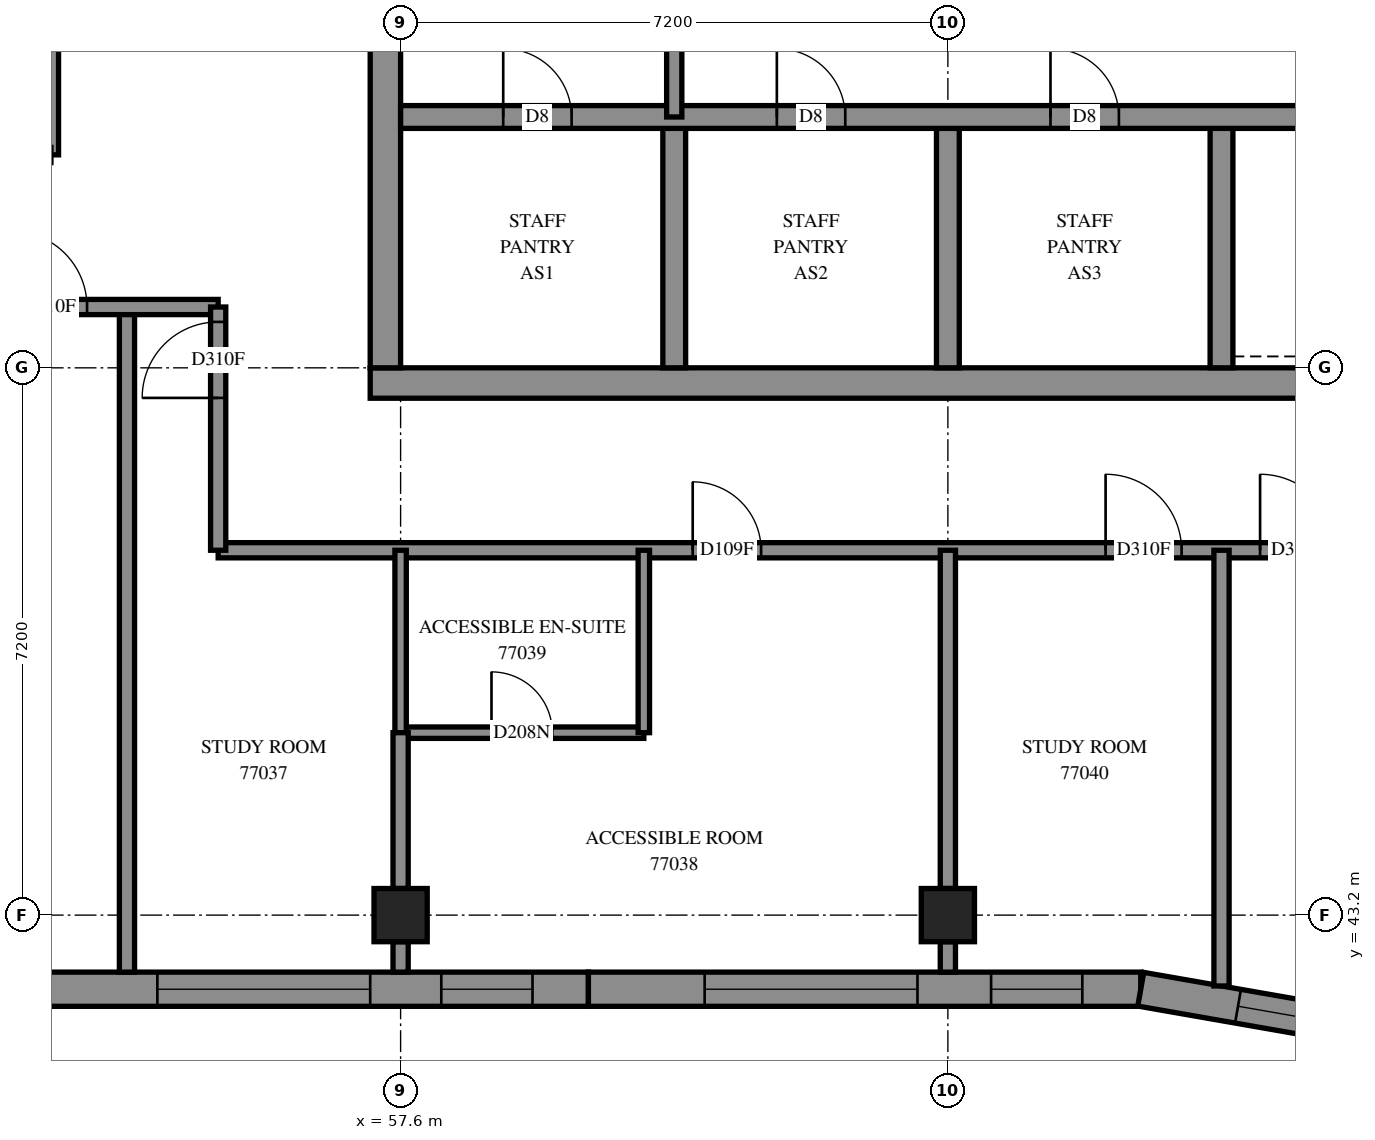
"""IFC4 building model, lengths in metres.
Left out: names, types, materials, properties, quantities, classifications, styles, units other than length and angle.
Written with IfcOpenShell. Run it as: python <this file> out.ifc"""

import sys

from ifc_helpers import new_model, si_unit, direction, frame, frame_2d, origin, origin_2d, place, context, subcontext, project, spatial, polyline, rectangle, outline, extrude, element, fill, save


model = new_model("IFC4")
c1 = context("Model", 3, precision=1e-05, world=origin(), true_north=direction((0.0, 1.0)))
c2 = subcontext(c1, "Body", "Model", "MODEL_VIEW")
j1 = project(units=[si_unit("LENGTHUNIT", "METRE"), si_unit("PLANEANGLEUNIT", "RADIAN")], contexts=[c1])
p1 = place(None, origin())
s1 = spatial("IfcSite", under=j1, at=p1, CompositionType="ELEMENT")
p2 = place(p1, origin())
s2 = spatial("IfcBuilding", under=s1, at=p2, CompositionType="ELEMENT")
p3 = place(p2, frame((0.0, 0.0, 281.2)))
s3 = spatial("IfcBuildingStorey", under=s2, at=p3, CompositionType="ELEMENT", Elevation=281.2)
for number, where, z_axis, x_axis in (
    (1, (57.6, 43.2, 0.0), (0.0, 0.0, 1.0), (1.0, 0.0, 0.0)),
    (2, (64.8, 43.2, 0.0), (0.0, 0.0, 1.0), (1.0, 0.0, 0.0)),
):
    element("IfcColumn", number, at=place(p3, frame(where, z_axis=z_axis, x_axis=x_axis)), inside=s3, PredefinedType="COLUMN", context=c2, shape_type="SweptSolid", body=[
        extrude(rectangle(XDim=0.7, YDim=0.7, at=origin_2d()), origin(), (0.0, 0.0, 1.0), 3.1),
    ])
p4 = place(p3, frame((57.2, 50.2, -0.3), z_axis=(0.0, 0.0, 1.0), x_axis=(1.0, 0.0, 0.0)))
e3 = element("IfcWall", 3, at=p4, inside=s3, PredefinedType="SHEAR", context=c2, shape_type="SweptSolid", body=[
    extrude(rectangle(XDim=15.2, YDim=0.4, at=frame_2d((7.6, 0.0))), origin(), (0.0, 0.0, 1.0), 2.7),
])
p5 = place(p3, frame((57.4, 50.4, -0.3), z_axis=(0.0, 0.0, 1.0), x_axis=(0.0, 1.0, 0.0)))
e4 = element("IfcWall", 4, at=p5, inside=s3, PredefinedType="SHEAR", context=c2, shape_type="SweptSolid", body=[
    extrude(rectangle(XDim=14.4, YDim=0.4, at=frame_2d((7.2, 0.0))), origin(), (0.0, 0.0, 1.0), 2.7),
])
p6 = place(p5, frame((4.55, 0.0, 0.3)))
e5 = element("IfcOpeningElement", 5, at=p6, cuts=e4, PredefinedType="OPENING", context=c2, shape_type="SweptSolid", body=[
    extrude(rectangle(XDim=1.1, YDim=2.1, at=frame_2d((0.55, 1.05))), frame((0.0, 0.21, 0.0), z_axis=(0.0, -1.0, 0.0), x_axis=(1.0, 0.0, 0.0)), (0.0, 0.0, 1.0), 0.42),
])
p7 = place(p5, frame((11.35, 0.0, 0.3)))
e6 = element("IfcOpeningElement", 6, at=p7, cuts=e4, PredefinedType="OPENING", context=c2, shape_type="SweptSolid", body=[
    extrude(rectangle(XDim=1.1, YDim=2.1, at=frame_2d((0.55, 1.05))), frame((0.0, 0.21, 0.0), z_axis=(0.0, -1.0, 0.0), x_axis=(1.0, 0.0, 0.0)), (0.0, 0.0, 1.0), 0.42),
])
for number, where, z_axis, x_axis in (
    (7, (61.2, 50.4, 0.0), (0.0, 0.0, 1.0), (0.0, 1.0, 0.0)),
    (8, (64.8, 50.4, 0.0), (0.0, 0.0, 1.0), (0.0, 1.0, 0.0)),
    (9, (68.4, 50.4, 0.0), (0.0, 0.0, 1.0), (0.0, 1.0, 0.0)),
):
    element("IfcWall", number, at=place(p3, frame(where, z_axis=z_axis, x_axis=x_axis)), inside=s3, PredefinedType="SOLIDWALL", context=c2, shape_type="SweptSolid", body=[
        extrude(rectangle(XDim=3.3, YDim=0.3, at=frame_2d((1.65, 0.0))), origin(), (0.0, 0.0, 1.0), 3.1),
    ])
p8 = place(p3, frame((57.6, 53.7, 0.0), z_axis=(0.0, 0.0, 1.0), x_axis=(1.0, 0.0, 0.0)))
e10 = element("IfcWall", 10, at=p8, inside=s3, PredefinedType="SOLIDWALL", context=c2, shape_type="SweptSolid", body=[
    extrude(rectangle(XDim=14.4, YDim=0.3, at=frame_2d((7.2, 0.0))), origin(), (0.0, 0.0, 1.0), 3.1),
])
p9 = place(p8, frame((1.35, 0.0, 0.0)))
e11 = element("IfcOpeningElement", 11, at=p9, cuts=e10, PredefinedType="OPENING", context=c2, shape_type="SweptSolid", body=[
    extrude(rectangle(XDim=0.9, YDim=2.1, at=frame_2d((0.45, 1.05))), frame((0.0, 0.16, 0.0), z_axis=(0.0, -1.0, 0.0), x_axis=(1.0, 0.0, 0.0)), (0.0, 0.0, 1.0), 0.32),
])
p10 = place(p8, frame((4.95, 0.0, 0.0)))
e12 = element("IfcOpeningElement", 12, at=p10, cuts=e10, PredefinedType="OPENING", context=c2, shape_type="SweptSolid", body=[
    extrude(rectangle(XDim=0.9, YDim=2.1, at=frame_2d((0.45, 1.05))), frame((0.0, 0.16, 0.0), z_axis=(0.0, -1.0, 0.0), x_axis=(1.0, 0.0, 0.0)), (0.0, 0.0, 1.0), 0.32),
])
p11 = place(p8, frame((8.55, 0.0, 0.0)))
e13 = element("IfcOpeningElement", 13, at=p11, cuts=e10, PredefinedType="OPENING", context=c2, shape_type="SweptSolid", body=[
    extrude(rectangle(XDim=0.9, YDim=2.1, at=frame_2d((0.45, 1.05))), frame((0.0, 0.16, 0.0), z_axis=(0.0, -1.0, 0.0), x_axis=(1.0, 0.0, 0.0)), (0.0, 0.0, 1.0), 0.32),
])
p12 = place(p8, frame((12.05, 0.0, 0.0)))
e14 = element("IfcOpeningElement", 14, at=p12, cuts=e10, PredefinedType="OPENING", context=c2, shape_type="SweptSolid", body=[
    extrude(rectangle(XDim=1.1, YDim=2.1, at=frame_2d((0.55, 1.05))), frame((0.0, 0.16, 0.0), z_axis=(0.0, -1.0, 0.0), x_axis=(1.0, 0.0, 0.0)), (0.0, 0.0, 1.0), 0.32),
])
p13 = place(p3, frame((52.786, 42.225, 0.0), z_axis=(0.0, 0.0, 1.0), x_axis=(1.0, 0.0, 0.0)))
e15 = element("IfcWall", 15, at=p13, inside=s3, PredefinedType="SOLIDWALL", context=c2, shape_type="SweptSolid", body=[
    extrude(outline(polyline([(0.037, -0.225), (7.285, -0.225), (7.285, 0.225), (-0.037, 0.225), (0.037, -0.225)])), origin(), (0.0, 0.0, 1.0), 3.1),
])
p14 = place(p13, frame((1.614, 0.0, 0.45)))
e16 = element("IfcOpeningElement", 16, at=p14, cuts=e15, PredefinedType="OPENING", context=c2, shape_type="SweptSolid", body=[
    extrude(rectangle(XDim=2.8, YDim=2.55, at=frame_2d((1.4, 1.275))), frame((0.0, 0.235, 0.0), z_axis=(0.0, -1.0, 0.0), x_axis=(1.0, 0.0, 0.0)), (0.0, 0.0, 1.0), 0.47),
])
p15 = place(p13, frame((5.349, 0.0, 0.45)))
e17 = element("IfcOpeningElement", 17, at=p15, cuts=e15, PredefinedType="OPENING", context=c2, shape_type="SweptSolid", body=[
    extrude(rectangle(XDim=1.2, YDim=2.55, at=frame_2d((0.6, 1.275))), frame((0.0, 0.235, 0.0), z_axis=(0.0, -1.0, 0.0), x_axis=(1.0, 0.0, 0.0)), (0.0, 0.0, 1.0), 0.47),
])
p16 = place(p3, frame((60.071, 42.225, 0.0), z_axis=(0.0, 0.0, 1.0), x_axis=(1.0, 0.0, 0.0)))
e18 = element("IfcWall", 18, at=p16, inside=s3, PredefinedType="SOLIDWALL", context=c2, shape_type="SweptSolid", body=[
    extrude(outline(polyline([(0.0, -0.225), (7.247, -0.225), (7.286, 0.225), (0.0, 0.225), (0.0, -0.225)])), origin(), (0.0, 0.0, 1.0), 3.1),
])
p17 = place(p16, frame((1.529, 0.0, 0.45)))
e19 = element("IfcOpeningElement", 19, at=p17, cuts=e18, PredefinedType="OPENING", context=c2, shape_type="SweptSolid", body=[
    extrude(rectangle(XDim=2.8, YDim=2.55, at=frame_2d((1.4, 1.275))), frame((0.0, 0.235, 0.0), z_axis=(0.0, -1.0, 0.0), x_axis=(1.0, 0.0, 0.0)), (0.0, 0.0, 1.0), 0.47),
])
p18 = place(p16, frame((5.298, 0.0, 0.45)))
e20 = element("IfcOpeningElement", 20, at=p18, cuts=e18, PredefinedType="OPENING", context=c2, shape_type="SweptSolid", body=[
    extrude(rectangle(XDim=1.2, YDim=2.55, at=frame_2d((0.6, 1.275))), frame((0.0, 0.235, 0.0), z_axis=(0.0, -1.0, 0.0), x_axis=(1.0, 0.0, 0.0)), (0.0, 0.0, 1.0), 0.47),
])
p19 = place(p3, frame((67.338, 42.225, 0.0), z_axis=(0.0, 0.0, 1.0), x_axis=(0.9850822859, -0.1720839619, 0.0)))
e21 = element("IfcWall", 21, at=p19, inside=s3, PredefinedType="SOLIDWALL", context=c2, shape_type="SweptSolid", body=[
    extrude(outline(polyline([(0.019, -0.225), (3.698, -0.225), (3.619, 0.225), (-0.019, 0.225), (0.019, -0.225)])), origin(), (0.0, 0.0, 1.0), 3.1),
])
p20 = place(p19, frame((1.299, 0.0, 0.45)))
e22 = element("IfcOpeningElement", 22, at=p20, cuts=e21, PredefinedType="OPENING", context=c2, shape_type="SweptSolid", body=[
    extrude(rectangle(XDim=1.2, YDim=2.55, at=frame_2d((0.6, 1.275))), frame((0.0, 0.235, 0.0), z_axis=(0.0, -1.0, 0.0), x_axis=(1.0, 0.0, 0.0)), (0.0, 0.0, 1.0), 0.47),
])
p21 = place(p3, frame((61.2, 53.7, 0.0), z_axis=(0.0, 0.0, 1.0), x_axis=(0.0, 1.0, 0.0)))
e23 = element("IfcWall", 23, at=p21, inside=s3, PredefinedType="PARTITIONING", context=c2, shape_type="SweptSolid", body=[
    extrude(rectangle(XDim=3.6, YDim=0.2, at=frame_2d((1.8, 0.0))), origin(), (0.0, 0.0, 1.0), 3.1),
])
p22 = place(p3, frame((55.2, 48.0, 0.0), z_axis=(0.0, 0.0, 1.0), x_axis=(1.0, 0.0, 0.0)))
e24 = element("IfcWall", 24, at=p22, inside=s3, PredefinedType="PARTITIONING", context=c2, shape_type="SweptSolid", body=[
    extrude(rectangle(XDim=19.15, YDim=0.2, at=frame_2d((9.575, 0.0))), origin(), (0.0, 0.0, 1.0), 3.1),
])
p23 = place(p22, frame((6.243, 0.0, 0.0)))
e25 = element("IfcOpeningElement", 25, at=p23, cuts=e24, PredefinedType="OPENING", context=c2, shape_type="SweptSolid", body=[
    extrude(rectangle(XDim=0.9, YDim=2.1, at=frame_2d((0.45, 1.05))), frame((0.0, 0.11, 0.0), z_axis=(0.0, -1.0, 0.0), x_axis=(1.0, 0.0, 0.0)), (0.0, 0.0, 1.0), 0.22),
])
p24 = place(p22, frame((11.675, 0.0, 0.0)))
e26 = element("IfcOpeningElement", 26, at=p24, cuts=e24, PredefinedType="OPENING", context=c2, shape_type="SweptSolid", body=[
    extrude(rectangle(XDim=1.0, YDim=2.1, at=frame_2d((0.5, 1.05))), frame((0.0, 0.11, 0.0), z_axis=(0.0, -1.0, 0.0), x_axis=(1.0, 0.0, 0.0)), (0.0, 0.0, 1.0), 0.22),
])
p25 = place(p22, frame((13.707, 0.0, 0.0)))
e27 = element("IfcOpeningElement", 27, at=p25, cuts=e24, PredefinedType="OPENING", context=c2, shape_type="SweptSolid", body=[
    extrude(rectangle(XDim=1.0, YDim=2.1, at=frame_2d((0.5, 1.05))), frame((0.0, 0.11, 0.0), z_axis=(0.0, -1.0, 0.0), x_axis=(1.0, 0.0, 0.0)), (0.0, 0.0, 1.0), 0.22),
])
p26 = place(p3, frame((54.0, 42.45, 0.0), z_axis=(0.0, 0.0, 1.0), x_axis=(0.0, 1.0, 0.0)))
e28 = element("IfcWall", 28, at=p26, inside=s3, PredefinedType="PARTITIONING", context=c2, shape_type="SweptSolid", body=[
    extrude(rectangle(XDim=8.75, YDim=0.2, at=frame_2d((4.375, 0.0))), origin(), (0.0, 0.0, 1.0), 3.1),
])
p27 = place(p3, frame((53.0, 53.202, 0.0), z_axis=(0.0, 0.0, 1.0), x_axis=(0.0, 1.0, 0.0)))
e29 = element("IfcWall", 29, at=p27, inside=s3, PredefinedType="PARTITIONING", context=c2, shape_type="SweptSolid", body=[
    extrude(rectangle(XDim=6.998, YDim=0.2, at=frame_2d((3.499, 0.0))), origin(), (0.0, 0.0, 1.0), 3.1),
])
p28 = place(p3, frame((68.4, 42.268, 0.0), z_axis=(0.0, 0.0, 1.0), x_axis=(0.0, 1.0, 0.0)))
e30 = element("IfcWall", 30, at=p28, inside=s3, PredefinedType="PARTITIONING", context=c2, shape_type="SweptSolid", body=[
    extrude(rectangle(XDim=5.732, YDim=0.2, at=frame_2d((2.866, 0.0))), origin(), (0.0, 0.0, 1.0), 3.1),
])
p29 = place(p3, frame((50.4, 51.2, 0.0), z_axis=(0.0, 0.0, 1.0), x_axis=(1.0, 0.0, 0.0)))
e31 = element("IfcWall", 31, at=p29, inside=s3, PredefinedType="PARTITIONING", context=c2, shape_type="SweptSolid", body=[
    extrude(rectangle(XDim=4.8, YDim=0.2, at=frame_2d((2.4, 0.0))), origin(), (0.0, 0.0, 1.0), 3.1),
])
p30 = place(p29, frame((2.075, 0.0, 0.0)))
e32 = element("IfcOpeningElement", 32, at=p30, cuts=e31, PredefinedType="OPENING", context=c2, shape_type="SweptSolid", body=[
    extrude(rectangle(XDim=1.0, YDim=2.1, at=frame_2d((0.5, 1.05))), frame((0.0, 0.11, 0.0), z_axis=(0.0, -1.0, 0.0), x_axis=(1.0, 0.0, 0.0)), (0.0, 0.0, 1.0), 0.22),
])
p31 = place(p3, frame((64.8, 43.55, 0.0), z_axis=(0.0, 0.0, 1.0), x_axis=(0.0, 1.0, 0.0)))
e33 = element("IfcWall", 33, at=p31, inside=s3, PredefinedType="PARTITIONING", context=c2, shape_type="SweptSolid", body=[
    extrude(rectangle(XDim=4.45, YDim=0.2, at=frame_2d((2.225, 0.0))), origin(), (0.0, 0.0, 1.0), 3.1),
])
p32 = place(p3, frame((55.2, 48.0, 0.0), z_axis=(0.0, 0.0, 1.0), x_axis=(0.0, 1.0, 0.0)))
e34 = element("IfcWall", 34, at=p32, inside=s3, PredefinedType="PARTITIONING", context=c2, shape_type="SweptSolid", body=[
    extrude(rectangle(XDim=3.2, YDim=0.2, at=frame_2d((1.6, 0.0))), origin(), (0.0, 0.0, 1.0), 3.1),
])
p33 = place(p32, frame((2.004, 0.0, 0.0)))
e35 = element("IfcOpeningElement", 35, at=p33, cuts=e34, PredefinedType="OPENING", context=c2, shape_type="SweptSolid", body=[
    extrude(rectangle(XDim=1.0, YDim=2.1, at=frame_2d((0.5, 1.05))), frame((0.0, 0.11, 0.0), z_axis=(0.0, -1.0, 0.0), x_axis=(1.0, 0.0, 0.0)), (0.0, 0.0, 1.0), 0.22),
])
p34 = place(p3, frame((57.6, 45.6, 0.0), z_axis=(0.0, 0.0, 1.0), x_axis=(1.0, 0.0, 0.0)))
e36 = element("IfcWall", 36, at=p34, inside=s3, PredefinedType="PARTITIONING", context=c2, shape_type="SweptSolid", body=[
    extrude(rectangle(XDim=3.2, YDim=0.15, at=frame_2d((1.6, 0.0))), origin(), (0.0, 0.0, 1.0), 3.1),
])
p35 = place(p34, frame((1.196, 0.0, 0.0)))
e37 = element("IfcOpeningElement", 37, at=p35, cuts=e36, PredefinedType="OPENING", context=c2, shape_type="SweptSolid", body=[
    extrude(rectangle(XDim=0.8, YDim=2.1, at=frame_2d((0.4, 1.05))), frame((0.0, 0.085, 0.0), z_axis=(0.0, -1.0, 0.0), x_axis=(1.0, 0.0, 0.0)), (0.0, 0.0, 1.0), 0.17),
])
for number, where, z_axis, x_axis in (
    (38, (60.8, 45.6, 0.0), (0.0, 0.0, 1.0), (0.0, 1.0, 0.0)),
    (39, (57.6, 45.6, 0.0), (0.0, 0.0, 1.0), (0.0, 1.0, 0.0)),
):
    element("IfcWall", number, at=place(p3, frame(where, z_axis=z_axis, x_axis=x_axis)), inside=s3, PredefinedType="PARTITIONING", context=c2, shape_type="SweptSolid", body=[
        extrude(rectangle(XDim=2.4, YDim=0.15, at=frame_2d((1.2, 0.0))), origin(), (0.0, 0.0, 1.0), 3.1),
    ])
p36 = place(p3, frame((57.6, 43.55, 0.0), z_axis=(0.0, 0.0, 1.0), x_axis=(0.0, 1.0, 0.0)))
e40 = element("IfcWall", 40, at=p36, inside=s3, PredefinedType="PARTITIONING", context=c2, shape_type="SweptSolid", body=[
    extrude(rectangle(XDim=2.05, YDim=0.2, at=frame_2d((1.025, 0.0))), origin(), (0.0, 0.0, 1.0), 3.1),
])
for number, where, z_axis, x_axis in (
    (41, (57.6, 42.45, 0.0), (0.0, 0.0, 1.0), (0.0, 1.0, 0.0)),
    (42, (64.8, 42.45, 0.0), (0.0, 0.0, 1.0), (0.0, 1.0, 0.0)),
):
    element("IfcWall", number, at=place(p3, frame(where, z_axis=z_axis, x_axis=x_axis)), inside=s3, PredefinedType="PARTITIONING", context=c2, shape_type="SweptSolid", body=[
        extrude(rectangle(XDim=0.4, YDim=0.2, at=frame_2d((0.2, 0.0))), origin(), (0.0, 0.0, 1.0), 3.1),
    ])
p37 = place(p14, origin())
e43 = element("IfcWindow", 43, at=p37, inside=s3, PartitioningType="SINGLE_PANEL", PredefinedType="WINDOW", context=c2, shape_type="SweptSolid", body=[
    extrude(rectangle(XDim=2.8, YDim=2.55, at=frame_2d((1.4, 1.275))), frame((0.0, 0.205, 0.0), z_axis=(0.0, -1.0, 0.0), x_axis=(1.0, 0.0, 0.0)), (0.0, 0.0, 1.0), 0.06),
])
fill(e16, e43)
p38 = place(p15, origin())
e44 = element("IfcWindow", 44, at=p38, inside=s3, PartitioningType="SINGLE_PANEL", PredefinedType="WINDOW", context=c2, shape_type="SweptSolid", body=[
    extrude(rectangle(XDim=1.2, YDim=2.55, at=frame_2d((0.6, 1.275))), frame((0.0, 0.205, 0.0), z_axis=(0.0, -1.0, 0.0), x_axis=(1.0, 0.0, 0.0)), (0.0, 0.0, 1.0), 0.06),
])
fill(e17, e44)
p39 = place(p17, origin())
e45 = element("IfcWindow", 45, at=p39, inside=s3, PartitioningType="SINGLE_PANEL", PredefinedType="WINDOW", context=c2, shape_type="SweptSolid", body=[
    extrude(rectangle(XDim=2.8, YDim=2.55, at=frame_2d((1.4, 1.275))), frame((0.0, 0.205, 0.0), z_axis=(0.0, -1.0, 0.0), x_axis=(1.0, 0.0, 0.0)), (0.0, 0.0, 1.0), 0.06),
])
fill(e19, e45)
p40 = place(p18, origin())
e46 = element("IfcWindow", 46, at=p40, inside=s3, PartitioningType="SINGLE_PANEL", PredefinedType="WINDOW", context=c2, shape_type="SweptSolid", body=[
    extrude(rectangle(XDim=1.2, YDim=2.55, at=frame_2d((0.6, 1.275))), frame((0.0, 0.205, 0.0), z_axis=(0.0, -1.0, 0.0), x_axis=(1.0, 0.0, 0.0)), (0.0, 0.0, 1.0), 0.06),
])
fill(e20, e46)
p41 = place(p20, origin())
e47 = element("IfcWindow", 47, at=p41, inside=s3, PartitioningType="SINGLE_PANEL", PredefinedType="WINDOW", context=c2, shape_type="SweptSolid", body=[
    extrude(rectangle(XDim=1.2, YDim=2.55, at=frame_2d((0.6, 1.275))), frame((0.0, 0.205, 0.0), z_axis=(0.0, -1.0, 0.0), x_axis=(1.0, 0.0, 0.0)), (0.0, 0.0, 1.0), 0.06),
])
fill(e22, e47)
p42 = place(p9, origin())
e48 = element("IfcDoor", 48, at=p42, inside=s3, OperationType="SINGLE_SWING_LEFT", PredefinedType="DOOR", context=c2, shape_type="SweptSolid", body=[
    extrude(rectangle(XDim=0.9, YDim=2.1, at=frame_2d((0.45, 1.05))), frame((0.0, 0.025, 0.0), z_axis=(0.0, -1.0, 0.0), x_axis=(1.0, 0.0, 0.0)), (0.0, 0.0, 1.0), 0.05),
])
fill(e11, e48)
p43 = place(p10, origin())
e49 = element("IfcDoor", 49, at=p43, inside=s3, OperationType="SINGLE_SWING_LEFT", PredefinedType="DOOR", context=c2, shape_type="SweptSolid", body=[
    extrude(rectangle(XDim=0.9, YDim=2.1, at=frame_2d((0.45, 1.05))), frame((0.0, 0.025, 0.0), z_axis=(0.0, -1.0, 0.0), x_axis=(1.0, 0.0, 0.0)), (0.0, 0.0, 1.0), 0.05),
])
fill(e12, e49)
p44 = place(p11, origin())
e50 = element("IfcDoor", 50, at=p44, inside=s3, OperationType="SINGLE_SWING_LEFT", PredefinedType="DOOR", context=c2, shape_type="SweptSolid", body=[
    extrude(rectangle(XDim=0.9, YDim=2.1, at=frame_2d((0.45, 1.05))), frame((0.0, 0.025, 0.0), z_axis=(0.0, -1.0, 0.0), x_axis=(1.0, 0.0, 0.0)), (0.0, 0.0, 1.0), 0.05),
])
fill(e13, e50)
p45 = place(p30, origin())
e51 = element("IfcDoor", 51, at=p45, inside=s3, OperationType="SINGLE_SWING_LEFT", PredefinedType="DOOR", context=c2, shape_type="SweptSolid", body=[
    extrude(rectangle(XDim=1.0, YDim=2.1, at=frame_2d((0.5, 1.05))), frame((0.0, 0.025, 0.0), z_axis=(0.0, -1.0, 0.0), x_axis=(1.0, 0.0, 0.0)), (0.0, 0.0, 1.0), 0.05),
])
fill(e32, e51)
p46 = place(p33, origin())
e52 = element("IfcDoor", 52, at=p46, inside=s3, OperationType="SINGLE_SWING_RIGHT", PredefinedType="DOOR", context=c2, shape_type="SweptSolid", body=[
    extrude(rectangle(XDim=1.0, YDim=2.1, at=frame_2d((0.5, 1.05))), frame((0.0, 0.025, 0.0), z_axis=(0.0, -1.0, 0.0), x_axis=(1.0, 0.0, 0.0)), (0.0, 0.0, 1.0), 0.05),
])
fill(e35, e52)
p47 = place(p23, origin())
e53 = element("IfcDoor", 53, at=p47, inside=s3, OperationType="SINGLE_SWING_LEFT", PredefinedType="DOOR", context=c2, shape_type="SweptSolid", body=[
    extrude(rectangle(XDim=0.9, YDim=2.1, at=frame_2d((0.45, 1.05))), frame((0.0, 0.025, 0.0), z_axis=(0.0, -1.0, 0.0), x_axis=(1.0, 0.0, 0.0)), (0.0, 0.0, 1.0), 0.05),
])
fill(e25, e53)
p48 = place(p35, origin())
e54 = element("IfcDoor", 54, at=p48, inside=s3, OperationType="SINGLE_SWING_RIGHT", PredefinedType="DOOR", context=c2, shape_type="SweptSolid", body=[
    extrude(rectangle(XDim=0.8, YDim=2.1, at=frame_2d((0.4, 1.05))), frame((0.0, 0.025, 0.0), z_axis=(0.0, -1.0, 0.0), x_axis=(1.0, 0.0, 0.0)), (0.0, 0.0, 1.0), 0.05),
])
fill(e37, e54)
p49 = place(p24, origin())
e55 = element("IfcDoor", 55, at=p49, inside=s3, OperationType="SINGLE_SWING_LEFT", PredefinedType="DOOR", context=c2, shape_type="SweptSolid", body=[
    extrude(rectangle(XDim=1.0, YDim=2.1, at=frame_2d((0.5, 1.05))), frame((0.0, 0.025, 0.0), z_axis=(0.0, -1.0, 0.0), x_axis=(1.0, 0.0, 0.0)), (0.0, 0.0, 1.0), 0.05),
])
fill(e26, e55)
p50 = place(p25, origin())
e56 = element("IfcDoor", 56, at=p50, inside=s3, OperationType="SINGLE_SWING_RIGHT", PredefinedType="DOOR", context=c2, shape_type="SweptSolid", body=[
    extrude(rectangle(XDim=1.0, YDim=2.1, at=frame_2d((0.5, 1.05))), frame((0.0, 0.025, 0.0), z_axis=(0.0, -1.0, 0.0), x_axis=(1.0, 0.0, 0.0)), (0.0, 0.0, 1.0), 0.05),
])
fill(e27, e56)
save(model, sys.argv[1])
